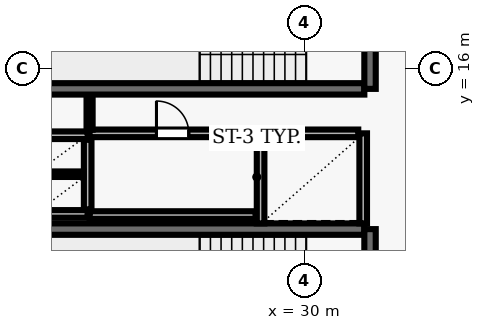
"""IFC4 building model, lengths in metres.
Left out: names, types, materials, properties, quantities, classifications, styles, units other than length and angle.
Written with IfcOpenShell. Run it as: python <this file> out.ifc"""

import sys

from ifc_helpers import new_model, si_unit, direction, frame, frame_2d, origin, place, context, subcontext, project, spatial, rectangle, extrude, element, fill, save


model = new_model("IFC4")
c1 = context("Model", 3, precision=1e-05, world=origin(), true_north=direction((0.0, 1.0)))
c2 = subcontext(c1, "Body", "Model", "MODEL_VIEW")
j1 = project(units=[si_unit("LENGTHUNIT", "METRE"), si_unit("PLANEANGLEUNIT", "RADIAN")], contexts=[c1])
p1 = place(None, origin())
s1 = spatial("IfcSite", under=j1, at=p1, CompositionType="ELEMENT")
p2 = place(p1, origin())
s2 = spatial("IfcBuilding", under=s1, at=p2, CompositionType="ELEMENT")
p3 = place(p2, frame((0.0, 0.0, 31.0)))
s3 = spatial("IfcBuildingStorey", under=s2, at=p3, CompositionType="ELEMENT", Elevation=31.0)
p4 = place(p3, frame((23.22, 15.47, 0.0), z_axis=(0.0, 0.0, 1.0), x_axis=(1.0, 0.0, 0.0)))
e1 = element("IfcWall", 1, at=p4, inside=s3, PredefinedType="SHEAR", context=c2, shape_type="SweptSolid", body=[
    extrude(rectangle(XDim=8.36, YDim=0.3, at=frame_2d((4.18, 0.0))), origin(), (0.0, 0.0, 1.0), 3.69),
])
p5 = place(p3, frame((31.73, 15.47, 0.0), z_axis=(0.0, 0.0, 1.0), x_axis=(0.0, 1.0, 0.0)))
e2 = element("IfcWall", 2, at=p5, inside=s3, PredefinedType="SHEAR", context=c2, shape_type="SweptSolid", body=[
    extrude(rectangle(XDim=3.51, YDim=0.3, at=frame_2d((1.755, 0.0))), origin(), (0.0, 0.0, 1.0), 3.69),
])
p6 = place(p5, frame((1.18, 0.0, 0.0)))
e3 = element("IfcOpeningElement", 3, at=p6, cuts=e2, PredefinedType="OPENING", context=c2, shape_type="SweptSolid", body=[
    extrude(rectangle(XDim=1.15, YDim=2.15, at=frame_2d((0.575, 1.075))), frame((0.0, 0.16, 0.0), z_axis=(0.0, -1.0, 0.0), x_axis=(1.0, 0.0, 0.0)), (0.0, 0.0, 1.0), 0.32),
])
p7 = place(p3, frame((31.58, 11.78, 0.0), z_axis=(0.0, 0.0, 1.0), x_axis=(-1.0, 0.0, 0.0)))
e4 = element("IfcWall", 4, at=p7, inside=s3, PredefinedType="SHEAR", context=c2, shape_type="SweptSolid", body=[
    extrude(rectangle(XDim=8.36, YDim=0.3, at=frame_2d((4.18, 0.0))), origin(), (0.0, 0.0, 1.0), 3.69),
])
p8 = place(p3, frame((31.73, 8.27, 0.0), z_axis=(0.0, 0.0, 1.0), x_axis=(0.0, 1.0, 0.0)))
e5 = element("IfcWall", 5, at=p8, inside=s3, PredefinedType="SHEAR", context=c2, shape_type="SweptSolid", body=[
    extrude(rectangle(XDim=3.51, YDim=0.3, at=frame_2d((1.755, 0.0))), origin(), (0.0, 0.0, 1.0), 3.69),
])
p9 = place(p8, frame((1.18, 0.0, 0.0)))
e6 = element("IfcOpeningElement", 6, at=p9, cuts=e5, PredefinedType="OPENING", context=c2, shape_type="SweptSolid", body=[
    extrude(rectangle(XDim=1.15, YDim=2.15, at=frame_2d((0.575, 1.075))), frame((0.0, 0.16, 0.0), z_axis=(0.0, -1.0, 0.0), x_axis=(1.0, 0.0, 0.0)), (0.0, 0.0, 1.0), 0.32),
])
for number, where, z_axis, x_axis in (
    (7, (28.85, 14.3, 0.0), (0.0, 0.0, 1.0), (0.0, -1.0, 0.0)),
    (8, (31.55, 11.93, 0.0), (0.0, 0.0, 1.0), (0.0, 1.0, 0.0)),
):
    element("IfcWall", number, at=place(p3, frame(where, z_axis=z_axis, x_axis=x_axis)), inside=s3, PredefinedType="SOLIDWALL", context=c2, shape_type="SweptSolid", body=[
        extrude(rectangle(XDim=2.37, YDim=0.2, at=frame_2d((1.185, 0.0))), origin(), (0.0, 0.0, 1.0), 3.69),
    ])
p10 = place(p3, frame((31.42, 14.3, 0.0), z_axis=(0.0, 0.0, 1.0), x_axis=(-1.0, 0.0, 0.0)))
e9 = element("IfcWall", 9, at=p10, inside=s3, PredefinedType="SOLIDWALL", context=c2, shape_type="SweptSolid", body=[
    extrude(rectangle(XDim=2.44, YDim=0.2, at=frame_2d((1.22, 0.0))), origin(), (0.0, 0.0, 1.0), 3.69),
])
for number, where, z_axis, x_axis in (
    (10, (22.9, 14.25, 0.0), (0.0, 0.0, 1.0), (1.0, 0.0, 0.0)),
    (11, (22.9, 12.18, 0.0), (0.0, 0.0, 1.0), (1.0, 0.0, 0.0)),
):
    element("IfcWall", number, at=place(p3, frame(where, z_axis=z_axis, x_axis=x_axis)), inside=s3, PredefinedType="SOLIDWALL", context=c2, shape_type="SweptSolid", body=[
        extrude(rectangle(XDim=1.4, YDim=0.2, at=frame_2d((0.7, 0.0))), origin(), (0.0, 0.0, 1.0), 3.69),
    ])
p11 = place(p3, frame((24.3, 12.3, 0.0), z_axis=(0.0, 0.0, 1.0), x_axis=(0.0, 1.0, 0.0)))
e12 = element("IfcWall", 12, at=p11, inside=s3, PredefinedType="SOLIDWALL", context=c2, shape_type="SweptSolid", body=[
    extrude(rectangle(XDim=1.83, YDim=0.2, at=frame_2d((0.915, 0.0))), origin(), (0.0, 0.0, 1.0), 3.69),
])
p12 = place(p3, frame((23.01, 13.225, 0.0), z_axis=(0.0, 0.0, 1.0), x_axis=(1.0, 0.0, 0.0)))
e13 = element("IfcWall", 13, at=p12, inside=s3, PredefinedType="PARTITIONING", context=c2, shape_type="SweptSolid", body=[
    extrude(rectangle(XDim=1.18, YDim=0.145, at=frame_2d((0.59, 0.0))), origin(), (0.0, 0.0, 1.0), 3.69),
])
p13 = place(p3, frame((24.35, 12.15, 0.0), z_axis=(0.0, 0.0, 1.0), x_axis=(1.0, 0.0, 0.0)))
e14 = element("IfcWall", 14, at=p13, inside=s3, PredefinedType="SOLIDWALL", context=c2, shape_type="SweptSolid", body=[
    extrude(rectangle(XDim=4.37, YDim=0.2, at=frame_2d((2.185, 0.0))), origin(), (0.0, 0.0, 1.0), 3.69),
])
p14 = place(p3, frame((24.35, 14.3, 0.0), z_axis=(0.0, 0.0, 1.0), x_axis=(1.0, 0.0, 0.0)))
e15 = element("IfcWall", 15, at=p14, inside=s3, PredefinedType="SOLIDWALL", context=c2, shape_type="SweptSolid", body=[
    extrude(rectangle(XDim=4.37, YDim=0.2, at=frame_2d((2.185, 0.0))), origin(), (0.0, 0.0, 1.0), 3.69),
])
p15 = place(p14, frame((1.76, 0.0, 0.0)))
e16 = element("IfcOpeningElement", 16, at=p15, cuts=e15, PredefinedType="OPENING", context=c2, shape_type="SweptSolid", body=[
    extrude(rectangle(XDim=0.85, YDim=2.1, at=frame_2d((0.425, 1.05))), frame((0.0, 0.11, 0.0), z_axis=(0.0, -1.0, 0.0), x_axis=(1.0, 0.0, 0.0)), (0.0, 0.0, 1.0), 0.22),
])
p16 = place(p3, frame((24.35, 15.29, 0.0), z_axis=(0.0, 0.0, 1.0), x_axis=(0.0, -1.0, 0.0)))
e17 = element("IfcWall", 17, at=p16, inside=s3, PredefinedType="PARTITIONING", context=c2, shape_type="SweptSolid", body=[
    extrude(rectangle(XDim=0.895, YDim=0.16, at=frame_2d((0.448, 0.0))), origin(), (0.0, 0.0, 1.0), 3.69),
])
p17 = place(p15, origin())
e18 = element("IfcDoor", 18, at=p17, inside=s3, OperationType="SINGLE_SWING_LEFT", PredefinedType="DOOR", context=c2, shape_type="SweptSolid", body=[
    extrude(rectangle(XDim=0.85, YDim=2.1, at=frame_2d((0.425, 1.05))), frame((0.0, 0.025, 0.0), z_axis=(0.0, -1.0, 0.0), x_axis=(1.0, 0.0, 0.0)), (0.0, 0.0, 1.0), 0.05),
])
fill(e16, e18)
save(model, sys.argv[1])
